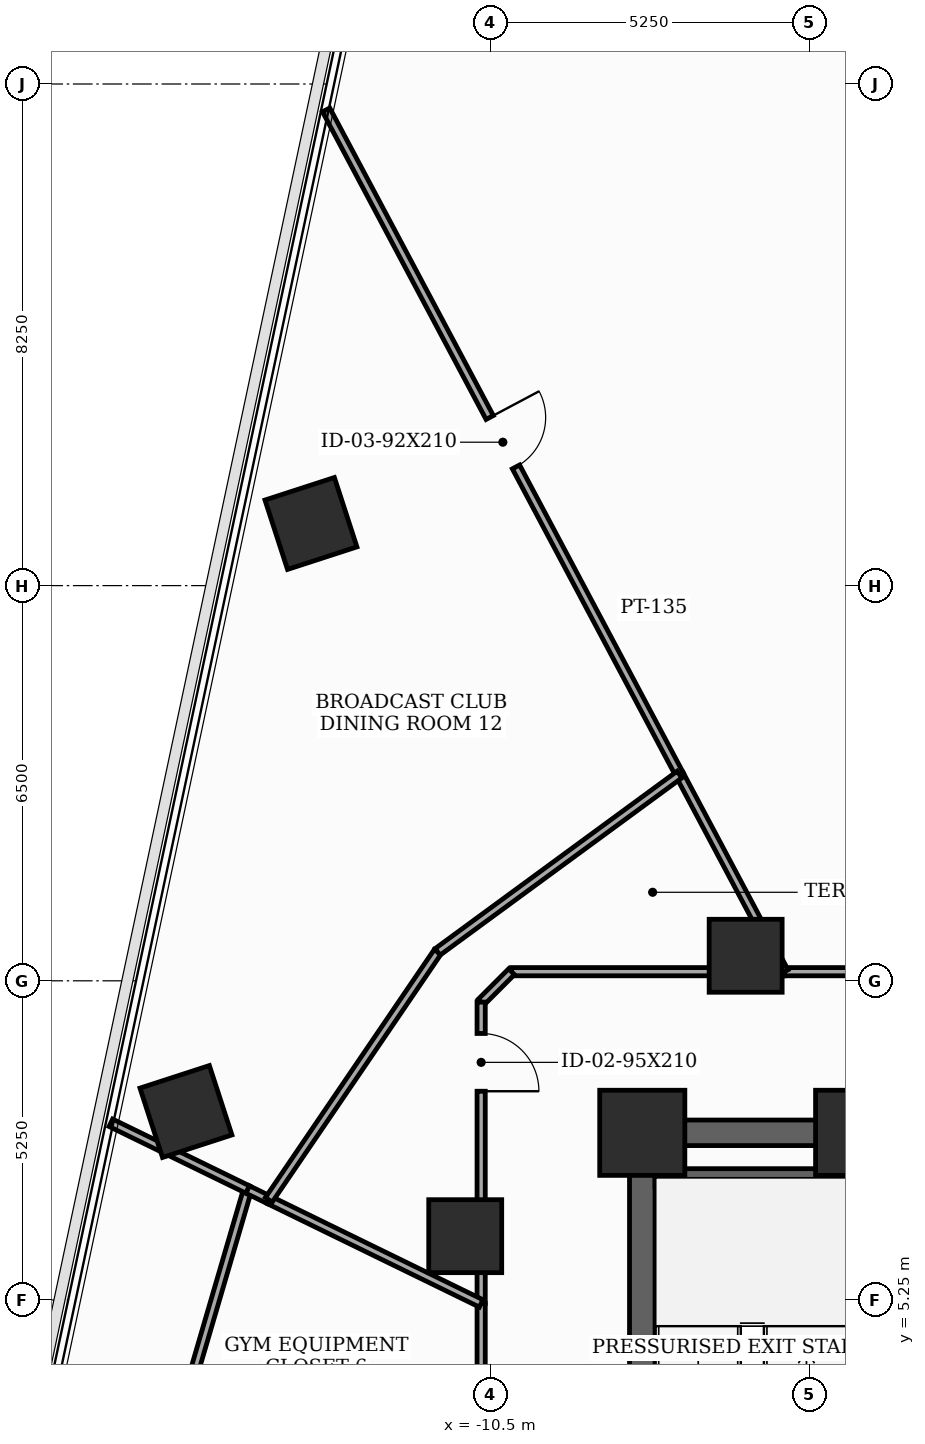
"""IFC4 building model, lengths in metres.
Left out: names, types, materials, properties, quantities, classifications, styles, units other than length and angle.
Written with IfcOpenShell. Run it as: python <this file> out.ifc"""

import sys

from ifc_helpers import new_model, si_unit, direction, frame, frame_2d, origin, origin_2d, place, context, subcontext, project, spatial, rectangle, extrude, element, fill, save


model = new_model("IFC4")
c1 = context("Model", 3, precision=1e-05, world=origin(), true_north=direction((0.0, 1.0)))
c2 = subcontext(c1, "Body", "Model", "MODEL_VIEW")
j1 = project(units=[si_unit("LENGTHUNIT", "METRE"), si_unit("PLANEANGLEUNIT", "RADIAN")], contexts=[c1])
p1 = place(None, origin())
s1 = spatial("IfcSite", under=j1, at=p1, CompositionType="ELEMENT")
p2 = place(p1, origin())
s2 = spatial("IfcBuilding", under=s1, at=p2, CompositionType="ELEMENT")
p3 = place(p2, frame((0.0, 0.0, 105.1)))
s3 = spatial("IfcBuildingStorey", under=s2, at=p3, CompositionType="ELEMENT", Elevation=105.1)
for number, where, z_axis, x_axis in (
    (1, (-4.45, 8.0, 0.0), (0.0, 0.0, 1.0), (1.0, 0.0, 0.0)),
    (2, (-8.0, 8.0, 0.0), (0.0, 0.0, 1.0), (1.0, 0.0, 0.0)),
):
    element("IfcColumn", number, at=place(p3, frame(where, z_axis=z_axis, x_axis=x_axis)), inside=s3, PredefinedType="COLUMN", context=c2, shape_type="SweptSolid", body=[
        extrude(rectangle(XDim=1.4, YDim=1.4, at=origin_2d()), origin(), (0.0, 0.0, 1.0), 3.7),
    ])
for number, where, z_axis, x_axis in (
    (3, (-6.3, 10.912, 0.0), (0.0, 0.0, 1.0), (1.0, 0.0, 0.0)),
    (4, (-10.912, 6.3, 0.0), (0.0, 0.0, 1.0), (1.0, 0.0, 0.0)),
    (5, (-13.449, 18.022, 0.0), (0.0, 0.0, 1.0), (0.951, 0.309, 0.0)),
    (6, (-15.505, 8.35, 0.0), (0.0, 0.0, 1.0), (0.951, 0.309, 0.0)),
):
    element("IfcColumn", number, at=place(p3, frame(where, z_axis=z_axis, x_axis=x_axis)), inside=s3, PredefinedType="COLUMN", context=c2, shape_type="SweptSolid", body=[
        extrude(rectangle(XDim=1.2, YDim=1.2, at=origin_2d()), origin(), (0.0, 0.0, 1.0), 3.7),
    ])
p4 = place(p3, frame((-8.0, -8.0, 0.0), z_axis=(0.0, 0.0, 1.0), x_axis=(0.0, 1.0, 0.0)))
e7 = element("IfcWall", 7, at=p4, inside=s3, PredefinedType="SHEAR", context=c2, shape_type="SweptSolid", body=[
    extrude(rectangle(XDim=16.0, YDim=0.42, at=frame_2d((8.0, 0.0))), origin(), (0.0, 0.0, 1.0), 3.5),
])
p5 = place(p4, frame((0.922, 0.0, 0.0)))
e8 = element("IfcOpeningElement", 8, at=p5, cuts=e7, PredefinedType="OPENING", context=c2, shape_type="SweptSolid", body=[
    extrude(rectangle(XDim=0.85, YDim=2.02, at=frame_2d((0.425, 1.01))), frame((0.0, 0.22, 0.0), z_axis=(0.0, -1.0, 0.0), x_axis=(1.0, 0.0, 0.0)), (0.0, 0.0, 1.0), 0.44),
])
p6 = place(p4, frame((5.35, 0.0, 0.0)))
e9 = element("IfcOpeningElement", 9, at=p6, cuts=e7, PredefinedType="OPENING", context=c2, shape_type="SweptSolid", body=[
    extrude(rectangle(XDim=1.05, YDim=2.15, at=frame_2d((0.525, 1.075))), frame((0.0, 0.22, 0.0), z_axis=(0.0, -1.0, 0.0), x_axis=(1.0, 0.0, 0.0)), (0.0, 0.0, 1.0), 0.44),
])
p7 = place(p3, frame((-8.0, 8.0, 0.0), z_axis=(0.0, 0.0, 1.0), x_axis=(1.0, 0.0, 0.0)))
e10 = element("IfcWall", 10, at=p7, inside=s3, PredefinedType="SHEAR", context=c2, shape_type="SweptSolid", body=[
    extrude(rectangle(XDim=16.0, YDim=0.42, at=frame_2d((8.0, 0.0))), origin(), (0.0, 0.0, 1.0), 3.5),
])
p8 = place(p7, frame((7.1, 0.0, 0.0)))
e11 = element("IfcOpeningElement", 11, at=p8, cuts=e10, PredefinedType="OPENING", context=c2, shape_type="SweptSolid", body=[
    extrude(rectangle(XDim=1.8, YDim=2.15, at=frame_2d((0.9, 1.075))), frame((0.0, 0.22, 0.0), z_axis=(0.0, -1.0, 0.0), x_axis=(1.0, 0.0, 0.0)), (0.0, 0.0, 1.0), 0.44),
])
p9 = place(p3, frame((-7.79, 7.26, 0.0), z_axis=(0.0, 0.0, 1.0), x_axis=(1.0, 0.0, 0.0)))
e12 = element("IfcWall", 12, at=p9, inside=s3, PredefinedType="SHEAR", context=c2, shape_type="SweptSolid", body=[
    extrude(rectangle(XDim=3.34, YDim=0.3, at=frame_2d((1.67, 0.0))), origin(), (0.0, 0.0, 1.0), 3.5),
])
p10 = place(p3, frame((-10.65, 5.194, 0.0), z_axis=(0.0, 0.0, 1.0), x_axis=(0.0, -1.0, 0.0)))
e13 = element("IfcWall", 13, at=p10, inside=s3, PredefinedType="PARTITIONING", context=c2, shape_type="SweptSolid", body=[
    extrude(rectangle(XDim=2.744, YDim=0.135, at=frame_2d((1.372, 0.0))), origin(), (0.0, 0.0, 1.0), 3.5),
])
p11 = place(p10, frame((1.226, 0.0, 0.0)))
e14 = element("IfcOpeningElement", 14, at=p11, cuts=e13, PredefinedType="OPENING", context=c2, shape_type="SweptSolid", body=[
    extrude(rectangle(XDim=0.95, YDim=2.1, at=frame_2d((0.475, 1.05))), frame((0.0, 0.077, 0.0), z_axis=(0.0, -1.0, 0.0), x_axis=(1.0, 0.0, 0.0)), (0.0, 0.0, 1.0), 0.155),
])
p12 = place(p3, frame((4.742, 10.65, 0.0), z_axis=(0.0, 0.0, 1.0), x_axis=(-1.0, 0.0, 0.0)))
e15 = element("IfcWall", 15, at=p12, inside=s3, PredefinedType="PARTITIONING", context=c2, shape_type="SweptSolid", body=[
    extrude(rectangle(XDim=10.405, YDim=0.135, at=frame_2d((5.203, 0.0))), origin(), (0.0, 0.0, 1.0), 2.785),
])
p13 = place(p12, frame((5.976, 0.0, 0.0)))
e16 = element("IfcOpeningElement", 16, at=p13, cuts=e15, PredefinedType="OPENING", context=c2, shape_type="SweptSolid", body=[
    extrude(rectangle(XDim=0.95, YDim=2.1, at=frame_2d((0.475, 1.05))), frame((0.0, 0.077, 0.0), z_axis=(0.0, -1.0, 0.0), x_axis=(1.0, 0.0, 0.0)), (0.0, 0.0, 1.0), 0.155),
])
p14 = place(p3, frame((-5.663, 10.65, 0.0), z_axis=(0.0, 0.0, 1.0), x_axis=(-1.0, 0.0, 0.0)))
e17 = element("IfcWall", 17, at=p14, inside=s3, PredefinedType="PARTITIONING", context=c2, shape_type="SweptSolid", body=[
    extrude(rectangle(XDim=4.487, YDim=0.135, at=frame_2d((2.243, 0.0))), origin(), (0.0, 0.0, 1.0), 2.785),
])
p15 = place(p3, frame((-10.15, 10.65, 0.0), z_axis=(0.0, 0.0, 1.0), x_axis=(-0.707106781187, -0.707106781187, 0.0)))
e18 = element("IfcWall", 18, at=p15, inside=s3, PredefinedType="PARTITIONING", context=c2, shape_type="SweptSolid", body=[
    extrude(rectangle(XDim=0.707, YDim=0.135, at=frame_2d((0.354, 0.0))), origin(), (0.0, 0.0, 1.0), 3.5),
])
p16 = place(p3, frame((-10.65, 10.15, 0.0), z_axis=(0.0, 0.0, 1.0), x_axis=(0.0, -1.0, 0.0)))
e19 = element("IfcWall", 19, at=p16, inside=s3, PredefinedType="PARTITIONING", context=c2, shape_type="SweptSolid", body=[
    extrude(rectangle(XDim=4.956, YDim=0.135, at=frame_2d((2.478, 0.0))), origin(), (0.0, 0.0, 1.0), 2.785),
])
p17 = place(p16, frame((0.516, 0.0, 0.0)))
e20 = element("IfcOpeningElement", 20, at=p17, cuts=e19, PredefinedType="OPENING", context=c2, shape_type="SweptSolid", body=[
    extrude(rectangle(XDim=0.95, YDim=2.1, at=frame_2d((0.475, 1.05))), frame((0.0, 0.077, 0.0), z_axis=(0.0, -1.0, 0.0), x_axis=(1.0, 0.0, 0.0)), (0.0, 0.0, 1.0), 0.155),
])
p18 = place(p3, frame((-14.491, 7.068, 0.0), z_axis=(0.0, 0.0, 1.0), x_axis=(-0.28111457881, -0.95967421221, 0.0)))
e21 = element("IfcWall", 21, at=p18, inside=s3, PredefinedType="PARTITIONING", context=c2, shape_type="SweptSolid", body=[
    extrude(rectangle(XDim=5.845, YDim=0.135, at=frame_2d((2.922, 0.0))), origin(), (0.0, 0.0, 1.0), 3.5),
])
p19 = place(p3, frame((-14.142, 6.898, 0.0), z_axis=(0.0, 0.0, 1.0), x_axis=(-0.898786579289, 0.438386456098, 0.0)))
e22 = element("IfcWall", 22, at=p19, inside=s3, PredefinedType="PARTITIONING", context=c2, shape_type="SweptSolid", body=[
    extrude(rectangle(XDim=0.388, YDim=0.135, at=frame_2d((0.194, 0.0))), origin(), (0.0, 0.0, 1.0), 3.5),
])
p20 = place(p3, frame((-10.65, 5.194, 0.0), z_axis=(0.0, 0.0, 1.0), x_axis=(-0.898732815367, 0.438496666558, 0.0)))
e23 = element("IfcWall", 23, at=p20, inside=s3, PredefinedType="PARTITIONING", context=c2, shape_type="SweptSolid", body=[
    extrude(rectangle(XDim=3.886, YDim=0.135, at=frame_2d((1.943, 0.0))), origin(), (0.0, 0.0, 1.0), 2.785),
])
p21 = place(p3, frame((-14.491, 7.068, 0.0), z_axis=(0.0, 0.0, 1.0), x_axis=(-0.898774071038, 0.438412099777, 0.0)))
e24 = element("IfcWall", 24, at=p21, inside=s3, PredefinedType="PARTITIONING", context=c2, shape_type="SweptSolid", body=[
    extrude(rectangle(XDim=2.503, YDim=0.135, at=frame_2d((1.251, 0.0))), origin(), (0.0, 0.0, 1.0), 2.935),
])
p22 = place(p3, frame((-13.199, 24.824, 0.0), z_axis=(0.0, 0.0, 1.0), x_axis=(0.46947528178, -0.882945615425, 0.0)))
e25 = element("IfcWall", 25, at=p22, inside=s3, PredefinedType="PARTITIONING", context=c2, shape_type="SweptSolid", body=[
    extrude(rectangle(XDim=12.38, YDim=0.135, at=frame_2d((6.19, 0.0))), origin(), (0.0, 0.0, 1.0), 2.935),
])
p23 = place(p22, frame((5.73, 0.0, 0.0)))
e26 = element("IfcOpeningElement", 26, at=p23, cuts=e25, PredefinedType="OPENING", context=c2, shape_type="SweptSolid", body=[
    extrude(rectangle(XDim=0.92, YDim=2.1, at=frame_2d((0.46, 1.05))), frame((0.0, 0.077, 0.0), z_axis=(0.0, -1.0, 0.0), x_axis=(1.0, 0.0, 0.0)), (0.0, 0.0, 1.0), 0.155),
])
p24 = place(p3, frame((-7.387, 13.893, 0.0), z_axis=(0.0, 0.0, 1.0), x_axis=(0.469356096826, -0.883008977515, 0.0)))
e27 = element("IfcWall", 27, at=p24, inside=s3, PredefinedType="PARTITIONING", context=c2, shape_type="SweptSolid", body=[
    extrude(rectangle(XDim=3.673, YDim=0.135, at=frame_2d((1.836, 0.0))), origin(), (0.0, 0.0, 1.0), 2.785),
])
p25 = place(p3, frame((-14.142, 6.898, 0.0), z_axis=(0.0, 0.0, 1.0), x_axis=(0.562725506953, 0.826643819202, 0.0)))
e28 = element("IfcWall", 28, at=p25, inside=s3, PredefinedType="PARTITIONING", context=c2, shape_type="SweptSolid", body=[
    extrude(rectangle(XDim=4.933, YDim=0.135, at=frame_2d((2.467, 0.0))), origin(), (0.0, 0.0, 1.0), 2.785),
])
p26 = place(p3, frame((-11.366, 10.976, 0.0), z_axis=(0.0, 0.0, 1.0), x_axis=(0.806496231999, 0.591239230576, 0.0)))
e29 = element("IfcWall", 29, at=p26, inside=s3, PredefinedType="PARTITIONING", context=c2, shape_type="SweptSolid", body=[
    extrude(rectangle(XDim=4.934, YDim=0.135, at=frame_2d((2.467, 0.0))), origin(), (0.0, 0.0, 1.0), 2.785),
])
p27 = place(p17, origin())
e30 = element("IfcDoor", 30, at=p27, inside=s3, OperationType="SINGLE_SWING_RIGHT", PredefinedType="DOOR", context=c2, shape_type="SweptSolid", body=[
    extrude(rectangle(XDim=0.95, YDim=2.1, at=frame_2d((0.475, 1.05))), frame((0.0, 0.025, 0.0), z_axis=(0.0, -1.0, 0.0), x_axis=(1.0, 0.0, 0.0)), (0.0, 0.0, 1.0), 0.05),
])
fill(e20, e30)
p28 = place(p23, origin())
e31 = element("IfcDoor", 31, at=p28, inside=s3, OperationType="SINGLE_SWING_LEFT", PredefinedType="DOOR", context=c2, shape_type="SweptSolid", body=[
    extrude(rectangle(XDim=0.92, YDim=2.1, at=frame_2d((0.46, 1.05))), frame((0.0, 0.025, 0.0), z_axis=(0.0, -1.0, 0.0), x_axis=(1.0, 0.0, 0.0)), (0.0, 0.0, 1.0), 0.05),
])
fill(e26, e31)
save(model, sys.argv[1])
